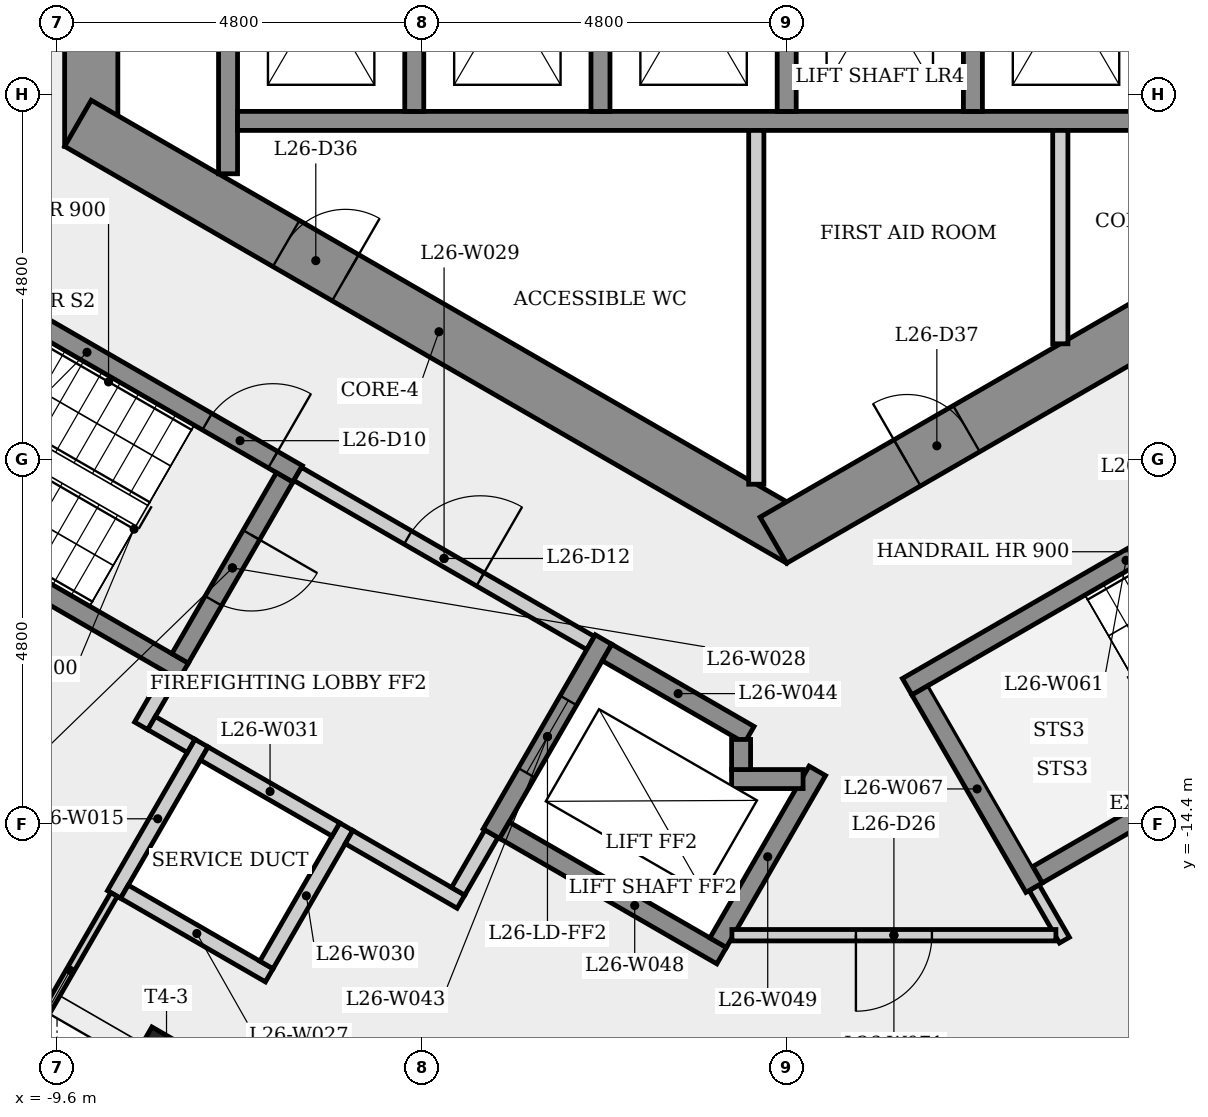
"""IFC4 building model, lengths in metres.
Left out: names, types, materials, properties, quantities, classifications, styles, units other than length and angle.
Written with IfcOpenShell. Run it as: python <this file> out.ifc"""

import sys

from ifc_helpers import new_model, si_unit, direction, frame, frame_2d, origin, origin_2d, place, context, subcontext, project, spatial, rectangle, extrude, element, fill, save


model = new_model("IFC4")
c1 = context("Model", 3, precision=1e-05, world=origin(), true_north=direction((0.0, 1.0)))
c2 = subcontext(c1, "Body", "Model", "MODEL_VIEW")
j1 = project(units=[si_unit("LENGTHUNIT", "METRE"), si_unit("PLANEANGLEUNIT", "RADIAN")], contexts=[c1])
p1 = place(None, origin())
s1 = spatial("IfcSite", under=j1, at=p1, CompositionType="ELEMENT")
p2 = place(p1, origin())
s2 = spatial("IfcBuilding", under=s1, at=p2, CompositionType="ELEMENT")
p3 = place(p2, frame((0.0, 0.0, 100.1)))
s3 = spatial("IfcBuildingStorey", under=s2, at=p3, CompositionType="ELEMENT", Elevation=100.1)
p4 = place(p3, frame((-9.15, 5.485, 0.0), z_axis=(0.0, 0.0, 1.0), x_axis=(0.0, -1.0, 0.0)))
e1 = element("IfcWall", 1, at=p4, inside=s3, PredefinedType="SHEAR", context=c2, shape_type="SweptSolid", body=[
    extrude(rectangle(XDim=10.97, YDim=0.7, at=frame_2d((5.485, 0.0))), origin(), (0.0, 0.0, 1.0), 3.4),
])
p5 = place(p4, frame((4.685, 0.0, 0.0)))
e2 = element("IfcOpeningElement", 2, at=p5, cuts=e1, PredefinedType="OPENING", context=c2, shape_type="SweptSolid", body=[
    extrude(rectangle(XDim=1.6, YDim=2.1, at=frame_2d((0.8, 1.05))), frame((0.0, 0.36, 0.0), z_axis=(0.0, -1.0, 0.0), x_axis=(1.0, 0.0, 0.0)), (0.0, 0.0, 1.0), 0.72),
])
p6 = place(p3, frame((-9.325, -5.182, 0.0), z_axis=(0.0, 0.0, 1.0), x_axis=(0.866023993627, -0.500002442456, 0.0)))
e3 = element("IfcWall", 3, at=p6, inside=s3, PredefinedType="SHEAR", context=c2, shape_type="SweptSolid", body=[
    extrude(rectangle(XDim=10.97, YDim=0.7, at=frame_2d((5.485, 0.0))), origin(), (0.0, 0.0, 1.0), 3.4),
])
p7 = place(p6, frame((3.164, 0.0, 0.0)))
e4 = element("IfcOpeningElement", 4, at=p7, cuts=e3, PredefinedType="OPENING", context=c2, shape_type="SweptSolid", body=[
    extrude(rectangle(XDim=0.9, YDim=2.1, at=frame_2d((0.45, 1.05))), frame((0.0, 0.36, 0.0), z_axis=(0.0, -1.0, 0.0), x_axis=(1.0, 0.0, 0.0)), (0.0, 0.0, 1.0), 0.72),
])
p8 = place(p3, frame((-0.175, -10.667, 0.0), z_axis=(0.0, 0.0, 1.0), x_axis=(0.866023993627, 0.500002442456, 0.0)))
e5 = element("IfcWall", 5, at=p8, inside=s3, PredefinedType="SHEAR", context=c2, shape_type="SweptSolid", body=[
    extrude(rectangle(XDim=10.97, YDim=0.7, at=frame_2d((5.485, 0.0))), origin(), (0.0, 0.0, 1.0), 3.4),
])
p9 = place(p8, frame((2.033, 0.0, 0.0)))
e6 = element("IfcOpeningElement", 6, at=p9, cuts=e5, PredefinedType="OPENING", context=c2, shape_type="SweptSolid", body=[
    extrude(rectangle(XDim=0.9, YDim=2.1, at=frame_2d((0.45, 1.05))), frame((0.0, 0.36, 0.0), z_axis=(0.0, -1.0, 0.0), x_axis=(1.0, 0.0, 0.0)), (0.0, 0.0, 1.0), 0.72),
])
p10 = place(p8, frame((8.754, 0.0, 0.0)))
e7 = element("IfcOpeningElement", 7, at=p10, cuts=e5, PredefinedType="OPENING", context=c2, shape_type="SweptSolid", body=[
    extrude(rectangle(XDim=0.9, YDim=2.1, at=frame_2d((0.45, 1.05))), frame((0.0, 0.36, 0.0), z_axis=(0.0, -1.0, 0.0), x_axis=(1.0, 0.0, 0.0)), (0.0, 0.0, 1.0), 0.72),
])
p11 = place(p3, frame((-8.159, -17.789, 0.0), z_axis=(0.0, 0.0, 1.0), x_axis=(-0.5, -0.866025403784, 0.0)))
e8 = element("IfcColumn", 8, at=p11, inside=s3, PredefinedType="COLUMN", context=c2, shape_type="SweptSolid", body=[
    extrude(rectangle(XDim=1.05, YDim=1.05, at=origin_2d()), origin(), (0.0, 0.0, 1.0), 3.4),
])
p12 = place(p3, frame((-11.977, -6.595, 0.0), z_axis=(0.0, 0.0, 1.0), x_axis=(0.866025499775, -0.499999833739, 0.0)))
e9 = element("IfcWall", 9, at=p12, inside=s3, PredefinedType="SHEAR", context=c2, shape_type="SweptSolid", body=[
    extrude(rectangle(XDim=6.4, YDim=0.25, at=frame_2d((3.2, 0.0))), origin(), (0.0, 0.0, 1.0), 3.05),
])
p13 = place(p12, frame((5.025, 0.0, 0.0)))
e10 = element("IfcOpeningElement", 10, at=p13, cuts=e9, PredefinedType="OPENING", context=c2, shape_type="SweptSolid", body=[
    extrude(rectangle(XDim=1.0, YDim=2.1, at=frame_2d((0.5, 1.05))), frame((0.0, 0.135, 0.0), z_axis=(0.0, -1.0, 0.0), x_axis=(1.0, 0.0, 0.0)), (0.0, 0.0, 1.0), 0.27),
])
p14 = place(p3, frame((-8.85, -15.329, 0.0), z_axis=(0.0, 0.0, 1.0), x_axis=(0.500077740698, 0.865980515519, 0.0)))
e11 = element("IfcWall", 11, at=p14, inside=s3, PredefinedType="PLUMBINGWALL", context=c2, shape_type="SweptSolid", body=[
    extrude(rectangle(XDim=2.3, YDim=0.2, at=frame_2d((1.15, 0.0))), origin(), (0.0, 0.0, 1.0), 3.05),
])
p15 = place(p3, frame((-8.85, -15.329, 0.0), z_axis=(0.0, 0.0, 1.0), x_axis=(-0.500009533716, -0.866019899421, 0.0)))
e12 = element("IfcWall", 12, at=p15, inside=s3, PredefinedType="PARTITIONING", context=c2, shape_type="SweptSolid", body=[
    extrude(rectangle(XDim=2.307, YDim=0.1, at=frame_2d((1.153, 0.0))), origin(), (0.0, 0.0, 1.0), 3.05),
])
p16 = place(p3, frame((-8.493, -13.11, 0.0), z_axis=(0.0, 0.0, 1.0), x_axis=(0.500067724834, 0.865986299303, 0.0)))
e13 = element("IfcWall", 13, at=p16, inside=s3, PredefinedType="PARTITIONING", context=c2, shape_type="SweptSolid", body=[
    extrude(rectangle(XDim=0.775, YDim=0.2, at=frame_2d((0.388, 0.0))), origin(), (0.0, 0.0, 1.0), 3.05),
])
p17 = place(p3, frame((-7.935, -12.393, 0.0), z_axis=(0.0, 0.0, 1.0), x_axis=(-0.866025499775, 0.499999833739, 0.0)))
e14 = element("IfcWall", 14, at=p17, inside=s3, PredefinedType="SHEAR", context=c2, shape_type="SweptSolid", body=[
    extrude(rectangle(XDim=6.4, YDim=0.25, at=frame_2d((3.2, 0.0))), origin(), (0.0, 0.0, 1.0), 3.05),
])
p18 = place(p3, frame((-7.836, -13.373, 0.0), z_axis=(0.0, 0.0, 1.0), x_axis=(-0.866232998003, 0.499640263761, 0.0)))
e15 = element("IfcWall", 15, at=p18, inside=s3, PredefinedType="PARTITIONING", context=c2, shape_type="SweptSolid", body=[
    extrude(rectangle(XDim=0.6, YDim=0.2, at=frame_2d((0.3, 0.0))), origin(), (0.0, 0.0, 1.0), 3.05),
])
p19 = place(p3, frame((-7.35, -5.846, 0.0), z_axis=(0.0, 0.0, 1.0), x_axis=(0.0, 1.0, 0.0)))
e16 = element("IfcWall", 16, at=p19, inside=s3, PredefinedType="SHEAR", context=c2, shape_type="SweptSolid", body=[
    extrude(rectangle(XDim=4.171, YDim=0.25, at=frame_2d((2.085, 0.0))), origin(), (0.0, 0.0, 1.0), 3.05),
])
p20 = place(p3, frame((-6.808, -16.392, 0.0), z_axis=(0.0, 0.0, 1.0), x_axis=(-0.866008176907, 0.50002983664, 0.0)))
e17 = element("IfcWall", 17, at=p20, inside=s3, PredefinedType="PLUMBINGWALL", context=c2, shape_type="SweptSolid", body=[
    extrude(rectangle(XDim=2.2, YDim=0.2, at=frame_2d((1.1, 0.0))), origin(), (0.0, 0.0, 1.0), 3.05),
])
p21 = place(p3, frame((-6.605, -9.841, 0.0), z_axis=(0.0, 0.0, 1.0), x_axis=(-0.499996545922, -0.866027397988, 0.0)))
e18 = element("IfcWall", 18, at=p21, inside=s3, PredefinedType="SHEAR", context=c2, shape_type="SweptSolid", body=[
    extrude(rectangle(XDim=2.75, YDim=0.25, at=frame_2d((1.375, 0.0))), origin(), (0.0, 0.0, 1.0), 3.05),
])
p22 = place(p21, frame((0.875, 0.0, 0.0)))
e19 = element("IfcOpeningElement", 19, at=p22, cuts=e18, PredefinedType="OPENING", context=c2, shape_type="SweptSolid", body=[
    extrude(rectangle(XDim=1.0, YDim=2.1, at=frame_2d((0.5, 1.05))), frame((0.0, 0.135, 0.0), z_axis=(0.0, -1.0, 0.0), x_axis=(1.0, 0.0, 0.0)), (0.0, 0.0, 1.0), 0.27),
])
p23 = place(p3, frame((-6.435, -9.795, 0.0), z_axis=(0.0, 0.0, 1.0), x_axis=(0.866012907634, -0.500021643343, 0.0)))
e20 = element("IfcWall", 20, at=p23, inside=s3, PredefinedType="PARTITIONING", context=c2, shape_type="SweptSolid", body=[
    extrude(rectangle(XDim=4.45, YDim=0.2, at=frame_2d((2.225, 0.0))), origin(), (0.0, 0.0, 1.0), 3.05),
])
p24 = place(p23, frame((1.675, 0.0, 0.0)))
e21 = element("IfcOpeningElement", 21, at=p24, cuts=e20, PredefinedType="OPENING", context=c2, shape_type="SweptSolid", body=[
    extrude(rectangle(XDim=1.1, YDim=2.1, at=frame_2d((0.55, 1.05))), frame((0.0, 0.11, 0.0), z_axis=(0.0, -1.0, 0.0), x_axis=(1.0, 0.0, 0.0)), (0.0, 0.0, 1.0), 0.22),
])
p25 = place(p3, frame((-5.795, -14.437, 0.0), z_axis=(0.0, 0.0, 1.0), x_axis=(-0.500027713859, -0.866009402589, 0.0)))
e22 = element("IfcWall", 22, at=p25, inside=s3, PredefinedType="PLUMBINGWALL", context=c2, shape_type="SweptSolid", body=[
    extrude(rectangle(XDim=2.1, YDim=0.2, at=frame_2d((1.05, 0.0))), origin(), (0.0, 0.0, 1.0), 3.05),
])
p26 = place(p3, frame((-5.931, -14.473, 0.0), z_axis=(0.0, 0.0, 1.0), x_axis=(-0.866041268327, 0.499972520799, 0.0)))
e23 = element("IfcWall", 23, at=p26, inside=s3, PredefinedType="PLUMBINGWALL", context=c2, shape_type="SweptSolid", body=[
    extrude(rectangle(XDim=2.0, YDim=0.2, at=frame_2d((1.0, 0.0))), origin(), (0.0, 0.0, 1.0), 3.05),
])
p27 = place(p3, frame((-7.225, -5.15, 0.0), z_axis=(0.0, 0.0, 1.0), x_axis=(1.0, 0.0, 0.0)))
e24 = element("IfcWall", 24, at=p27, inside=s3, PredefinedType="SHEAR", context=c2, shape_type="SweptSolid", body=[
    extrude(rectangle(XDim=14.7, YDim=0.25, at=frame_2d((7.35, 0.0))), origin(), (0.0, 0.0, 1.0), 3.05),
])
p28 = place(p3, frame((-4.9, -1.925, 0.0), z_axis=(0.0, 0.0, 1.0), x_axis=(0.0, -1.0, 0.0)))
e25 = element("IfcWall", 25, at=p28, inside=s3, PredefinedType="SHEAR", context=c2, shape_type="SweptSolid", body=[
    extrude(rectangle(XDim=3.1, YDim=0.25, at=frame_2d((1.55, 0.0))), origin(), (0.0, 0.0, 1.0), 3.4),
])
p29 = place(p3, frame((-4.286, -15.423, 0.0), z_axis=(0.0, 0.0, 1.0), x_axis=(-0.866025371046, 0.500000056704, 0.0)))
e26 = element("IfcWall", 26, at=p29, inside=s3, PredefinedType="PARTITIONING", context=c2, shape_type="SweptSolid", body=[
    extrude(rectangle(XDim=1.7, YDim=0.2, at=frame_2d((0.85, 0.0))), origin(), (0.0, 0.0, 1.0), 3.05),
])
p30 = place(p3, frame((-3.885, -14.529, 0.0), z_axis=(0.0, 0.0, 1.0), x_axis=(-0.499859285417, -0.866106630146, 0.0)))
e27 = element("IfcWall", 27, at=p30, inside=s3, PredefinedType="PARTITIONING", context=c2, shape_type="SweptSolid", body=[
    extrude(rectangle(XDim=0.875, YDim=0.2, at=frame_2d((0.438, 0.0))), origin(), (0.0, 0.0, 1.0), 3.05),
])
p31 = place(p3, frame((-2.41, -11.974, 0.0), z_axis=(0.0, 0.0, 1.0), x_axis=(-0.500001826776, -0.866024349092, 0.0)))
e28 = element("IfcWall", 28, at=p31, inside=s3, PredefinedType="SHEAR", context=c2, shape_type="SweptSolid", body=[
    extrude(rectangle(XDim=2.95, YDim=0.25, at=frame_2d((1.475, 0.0))), origin(), (0.0, 0.0, 1.0), 3.05),
])
p32 = place(p31, frame((0.925, 0.0, 0.0)))
e29 = element("IfcOpeningElement", 29, at=p32, cuts=e28, PredefinedType="OPENING", context=c2, shape_type="SweptSolid", body=[
    extrude(rectangle(XDim=1.1, YDim=2.1, at=frame_2d((0.55, 1.05))), frame((0.0, 0.135, 0.0), z_axis=(0.0, -1.0, 0.0), x_axis=(1.0, 0.0, 0.0)), (0.0, 0.0, 1.0), 0.27),
])
p33 = place(p3, frame((-2.364, -12.145, 0.0), z_axis=(0.0, 0.0, 1.0), x_axis=(0.86603892542, -0.499976579108, 0.0)))
e30 = element("IfcWall", 30, at=p33, inside=s3, PredefinedType="SHEAR", context=c2, shape_type="SweptSolid", body=[
    extrude(rectangle(XDim=2.162, YDim=0.25, at=frame_2d((1.081, 0.0))), origin(), (0.0, 0.0, 1.0), 3.05),
])
p34 = place(p3, frame((-2.45, -1.925, 0.0), z_axis=(0.0, 0.0, 1.0), x_axis=(0.0, -1.0, 0.0)))
e31 = element("IfcWall", 31, at=p34, inside=s3, PredefinedType="SHEAR", context=c2, shape_type="SweptSolid", body=[
    extrude(rectangle(XDim=3.1, YDim=0.25, at=frame_2d((1.55, 0.0))), origin(), (0.0, 0.0, 1.0), 3.4),
])
p35 = place(p3, frame((-0.856, -16.133, 0.0), z_axis=(0.0, 0.0, 1.0), x_axis=(-0.866021716278, 0.500006386895, 0.0)))
e32 = element("IfcWall", 32, at=p35, inside=s3, PredefinedType="SHEAR", context=c2, shape_type="SweptSolid", body=[
    extrude(rectangle(XDim=3.3, YDim=0.25, at=frame_2d((1.65, 0.0))), origin(), (0.0, 0.0, 1.0), 3.05),
])
p36 = place(p3, frame((-0.902, -15.962, 0.0), z_axis=(0.0, 0.0, 1.0), x_axis=(0.499981517636, 0.866036074319, 0.0)))
e33 = element("IfcWall", 33, at=p36, inside=s3, PredefinedType="SHEAR", context=c2, shape_type="SweptSolid", body=[
    extrude(rectangle(XDim=2.61, YDim=0.25, at=frame_2d((1.305, 0.0))), origin(), (0.0, 0.0, 1.0), 3.05),
])
p37 = place(p3, frame((-0.725, -13.81, 0.0), z_axis=(0.0, 0.0, 1.0), x_axis=(1.0, 0.0, 0.0)))
e34 = element("IfcWall", 34, at=p37, inside=s3, PredefinedType="SHEAR", context=c2, shape_type="SweptSolid", body=[
    extrude(rectangle(XDim=0.941, YDim=0.25, at=frame_2d((0.47, 0.0))), origin(), (0.0, 0.0, 1.0), 3.4),
])
p38 = place(p3, frame((-0.6, -13.289, 0.0), z_axis=(0.0, 0.0, 1.0), x_axis=(0.0, -1.0, 0.0)))
e35 = element("IfcWall", 35, at=p38, inside=s3, PredefinedType="SHEAR", context=c2, shape_type="SweptSolid", body=[
    extrude(rectangle(XDim=0.396, YDim=0.25, at=frame_2d((0.198, 0.0))), origin(), (0.0, 0.0, 1.0), 3.4),
])
p39 = place(p3, frame((-0.4, -5.275, 0.0), z_axis=(0.0, 0.0, 1.0), x_axis=(0.0, -1.0, 0.0)))
e36 = element("IfcWall", 36, at=p39, inside=s3, PredefinedType="PARTITIONING", context=c2, shape_type="SweptSolid", body=[
    extrude(rectangle(XDim=4.656, YDim=0.2, at=frame_2d((2.328, 0.0))), origin(), (0.0, 0.0, 1.0), 3.05),
])
p40 = place(p3, frame((0.0, -1.925, 0.0), z_axis=(0.0, 0.0, 1.0), x_axis=(0.0, -1.0, 0.0)))
e37 = element("IfcWall", 37, at=p40, inside=s3, PredefinedType="SHEAR", context=c2, shape_type="SweptSolid", body=[
    extrude(rectangle(XDim=3.1, YDim=0.25, at=frame_2d((1.55, 0.0))), origin(), (0.0, 0.0, 1.0), 3.4),
])
p41 = place(p3, frame((1.585, -12.595, 0.0), z_axis=(0.0, 0.0, 1.0), x_axis=(0.866036417653, 0.499980922934, 0.0)))
e38 = element("IfcWall", 38, at=p41, inside=s3, PredefinedType="SHEAR", context=c2, shape_type="SweptSolid", body=[
    extrude(rectangle(XDim=6.65, YDim=0.25, at=frame_2d((3.325, 0.0))), origin(), (0.0, 0.0, 1.0), 3.05),
])
p42 = place(p41, frame((5.275, 0.0, 0.0)))
e39 = element("IfcOpeningElement", 39, at=p42, cuts=e38, PredefinedType="OPENING", context=c2, shape_type="SweptSolid", body=[
    extrude(rectangle(XDim=1.0, YDim=2.1, at=frame_2d((0.5, 1.05))), frame((0.0, 0.135, 0.0), z_axis=(0.0, -1.0, 0.0), x_axis=(1.0, 0.0, 0.0)), (0.0, 0.0, 1.0), 0.27),
])
p43 = place(p3, frame((2.45, -1.925, 0.0), z_axis=(0.0, 0.0, 1.0), x_axis=(0.0, -1.0, 0.0)))
e40 = element("IfcWall", 40, at=p43, inside=s3, PredefinedType="SHEAR", context=c2, shape_type="SweptSolid", body=[
    extrude(rectangle(XDim=3.1, YDim=0.25, at=frame_2d((1.55, 0.0))), origin(), (0.0, 0.0, 1.0), 3.4),
])
p44 = place(p3, frame((3.256, -15.239, 0.0), z_axis=(0.0, 0.0, 1.0), x_axis=(0.499925626596, -0.866068339032, 0.0)))
e41 = element("IfcWall", 41, at=p44, inside=s3, PredefinedType="PARTITIONING", context=c2, shape_type="SweptSolid", body=[
    extrude(rectangle(XDim=0.797, YDim=0.15, at=frame_2d((0.399, 0.0))), origin(), (0.0, 0.0, 1.0), 3.05),
])
p45 = place(p3, frame((3.256, -15.239, 0.0), z_axis=(0.0, 0.0, 1.0), x_axis=(-0.50002537861, 0.866010750942, 0.0)))
e42 = element("IfcWall", 42, at=p45, inside=s3, PredefinedType="SHEAR", context=c2, shape_type="SweptSolid", body=[
    extrude(rectangle(XDim=3.0, YDim=0.25, at=frame_2d((1.5, 0.0))), origin(), (0.0, 0.0, 1.0), 3.05),
])
p46 = place(p3, frame((3.6, -5.275, 0.0), z_axis=(0.0, 0.0, 1.0), x_axis=(0.0, -1.0, 0.0)))
e43 = element("IfcWall", 43, at=p46, inside=s3, PredefinedType="PARTITIONING", context=c2, shape_type="SweptSolid", body=[
    extrude(rectangle(XDim=2.808, YDim=0.2, at=frame_2d((1.404, 0.0))), origin(), (0.0, 0.0, 1.0), 3.05),
])
p47 = place(p3, frame((3.542, -15.865, 0.0), z_axis=(0.0, 0.0, 1.0), x_axis=(-1.0, 0.0, 0.0)))
e44 = element("IfcWall", 44, at=p47, inside=s3, PredefinedType="PARTITIONING", context=c2, shape_type="SweptSolid", body=[
    extrude(rectangle(XDim=4.263, YDim=0.15, at=frame_2d((2.131, 0.0))), origin(), (0.0, 0.0, 1.0), 3.05),
])
p48 = place(p47, frame((1.631, 0.0, 0.0)))
e45 = element("IfcOpeningElement", 45, at=p48, cuts=e44, PredefinedType="OPENING", context=c2, shape_type="SweptSolid", body=[
    extrude(rectangle(XDim=1.0, YDim=2.1, at=frame_2d((0.5, 1.05))), frame((0.0, 0.085, 0.0), z_axis=(0.0, -1.0, 0.0), x_axis=(1.0, 0.0, 0.0)), (0.0, 0.0, 1.0), 0.17),
])
p49 = place(p3, frame((3.301, -15.068, 0.0), z_axis=(0.0, 0.0, 1.0), x_axis=(0.866035036182, 0.499983315828, 0.0)))
e46 = element("IfcWall", 46, at=p49, inside=s3, PredefinedType="SHEAR", context=c2, shape_type="SweptSolid", body=[
    extrude(rectangle(XDim=6.4, YDim=0.25, at=frame_2d((3.2, 0.0))), origin(), (0.0, 0.0, 1.0), 3.05),
])
p50 = place(p13, origin())
e47 = element("IfcDoor", 47, at=p50, inside=s3, OperationType="SINGLE_SWING_RIGHT", PredefinedType="DOOR", context=c2, shape_type="SweptSolid", body=[
    extrude(rectangle(XDim=1.0, YDim=2.1, at=frame_2d((0.5, 1.05))), frame((0.0, 0.025, 0.0), z_axis=(0.0, -1.0, 0.0), x_axis=(1.0, 0.0, 0.0)), (0.0, 0.0, 1.0), 0.05),
])
fill(e10, e47)
p51 = place(p22, origin())
e48 = element("IfcDoor", 48, at=p51, inside=s3, OperationType="SINGLE_SWING_LEFT", PredefinedType="DOOR", context=c2, shape_type="SweptSolid", body=[
    extrude(rectangle(XDim=1.0, YDim=2.1, at=frame_2d((0.5, 1.05))), frame((0.0, 0.025, 0.0), z_axis=(0.0, -1.0, 0.0), x_axis=(1.0, 0.0, 0.0)), (0.0, 0.0, 1.0), 0.05),
])
fill(e19, e48)
p52 = place(p24, origin())
e49 = element("IfcDoor", 49, at=p52, inside=s3, OperationType="SINGLE_SWING_RIGHT", PredefinedType="DOOR", context=c2, shape_type="SweptSolid", body=[
    extrude(rectangle(XDim=1.1, YDim=2.1, at=frame_2d((0.55, 1.05))), frame((0.0, 0.025, 0.0), z_axis=(0.0, -1.0, 0.0), x_axis=(1.0, 0.0, 0.0)), (0.0, 0.0, 1.0), 0.05),
])
fill(e21, e49)
p53 = place(p32, origin())
e50 = element("IfcDoor", 50, at=p53, inside=s3, OperationType="SLIDING_TO_LEFT", PredefinedType="DOOR", context=c2, shape_type="SweptSolid", body=[
    extrude(rectangle(XDim=1.1, YDim=2.1, at=frame_2d((0.55, 1.05))), frame((0.0, 0.025, 0.0), z_axis=(0.0, -1.0, 0.0), x_axis=(1.0, 0.0, 0.0)), (0.0, 0.0, 1.0), 0.05),
])
fill(e29, e50)
p54 = place(p48, origin())
e51 = element("IfcDoor", 51, at=p54, inside=s3, OperationType="SINGLE_SWING_RIGHT", PredefinedType="DOOR", context=c2, shape_type="SweptSolid", body=[
    extrude(rectangle(XDim=1.0, YDim=2.1, at=frame_2d((0.5, 1.05))), frame((0.0, 0.025, 0.0), z_axis=(0.0, -1.0, 0.0), x_axis=(1.0, 0.0, 0.0)), (0.0, 0.0, 1.0), 0.05),
])
fill(e45, e51)
p55 = place(p7, origin())
e52 = element("IfcDoor", 52, at=p55, inside=s3, OperationType="SINGLE_SWING_RIGHT", PredefinedType="DOOR", context=c2, shape_type="SweptSolid", body=[
    extrude(rectangle(XDim=0.9, YDim=2.1, at=frame_2d((0.45, 1.05))), frame((0.0, 0.025, 0.0), z_axis=(0.0, -1.0, 0.0), x_axis=(1.0, 0.0, 0.0)), (0.0, 0.0, 1.0), 0.05),
])
fill(e4, e52)
p56 = place(p9, origin())
e53 = element("IfcDoor", 53, at=p56, inside=s3, OperationType="SINGLE_SWING_LEFT", PredefinedType="DOOR", context=c2, shape_type="SweptSolid", body=[
    extrude(rectangle(XDim=0.9, YDim=2.1, at=frame_2d((0.45, 1.05))), frame((0.0, 0.025, 0.0), z_axis=(0.0, -1.0, 0.0), x_axis=(1.0, 0.0, 0.0)), (0.0, 0.0, 1.0), 0.05),
])
fill(e6, e53)
save(model, sys.argv[1])
